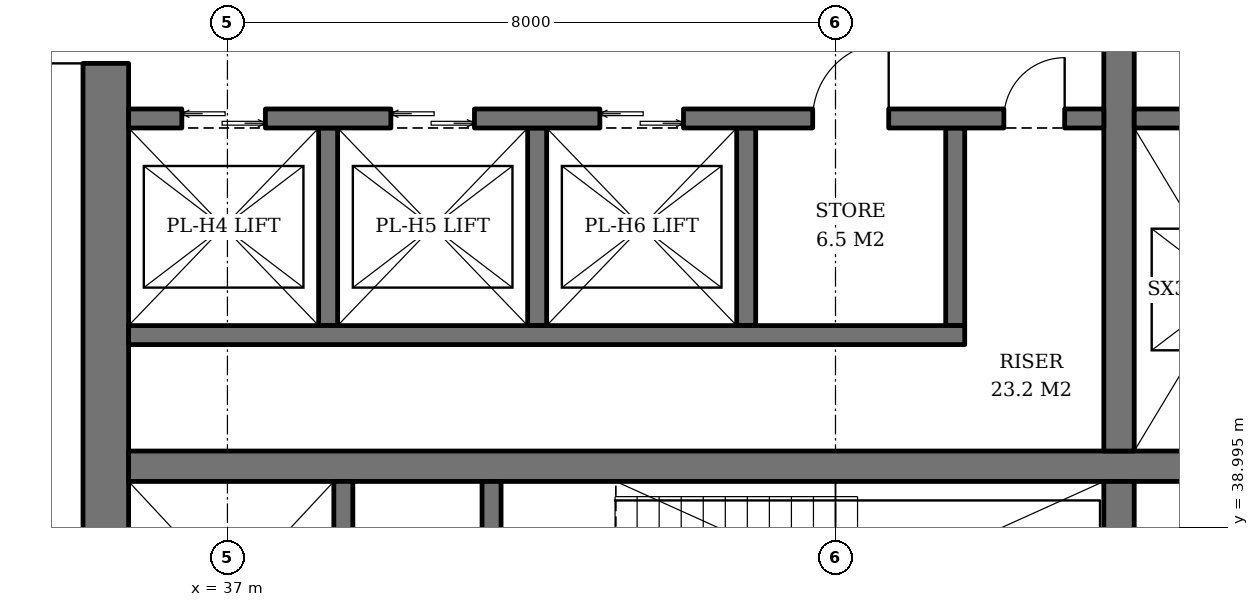
"""IFC4 building model, lengths in metres.
Left out: names, types, materials, properties, quantities, classifications, styles, units other than length and angle.
Written with IfcOpenShell. Run it as: python <this file> out.ifc"""

import sys

from ifc_helpers import new_model, si_unit, direction, frame, frame_2d, origin, place, context, subcontext, project, spatial, rectangle, extrude, element, fill, save


model = new_model("IFC4")
c1 = context("Model", 3, precision=1e-05, world=origin(), true_north=direction((0.0, 1.0)))
c2 = subcontext(c1, "Body", "Model", "MODEL_VIEW")
j1 = project(units=[si_unit("LENGTHUNIT", "METRE"), si_unit("PLANEANGLEUNIT", "RADIAN")], contexts=[c1])
p1 = place(None, origin())
s1 = spatial("IfcSite", under=j1, at=p1, CompositionType="ELEMENT")
p2 = place(p1, origin())
s2 = spatial("IfcBuilding", under=s1, at=p2, CompositionType="ELEMENT")
p3 = place(p2, frame((0.0, 0.0, 188.2)))
s3 = spatial("IfcBuildingStorey", under=s2, at=p3, CompositionType="ELEMENT", Elevation=188.2)
p4 = place(p3, frame((35.4, 36.7, 0.0), z_axis=(0.0, 0.0, 1.0), x_axis=(0.0, 1.0, 0.0)))
e1 = element("IfcWall", 1, at=p4, inside=s3, PredefinedType="SHEAR", context=c2, shape_type="SweptSolid", body=[
    extrude(rectangle(XDim=18.6, YDim=0.6, at=frame_2d((9.3, 0.0))), origin(), (0.0, 0.0, 1.0), 3.8),
])
p5 = place(p4, frame((8.4, 0.0, 0.0)))
e2 = element("IfcOpeningElement", 2, at=p5, cuts=e1, PredefinedType="OPENING", context=c2, shape_type="SweptSolid", body=[
    extrude(rectangle(XDim=1.8, YDim=2.4, at=frame_2d((0.9, 1.2))), frame((0.0, 0.31, 0.0), z_axis=(0.0, -1.0, 0.0), x_axis=(1.0, 0.0, 0.0)), (0.0, 0.0, 1.0), 0.62),
])
p6 = place(p3, frame((35.7, 39.8, 0.0), z_axis=(0.0, 0.0, 1.0), x_axis=(1.0, 0.0, 0.0)))
e3 = element("IfcWall", 3, at=p6, inside=s3, PredefinedType="SHEAR", context=c2, shape_type="SweptSolid", body=[
    extrude(rectangle(XDim=18.6, YDim=0.4, at=frame_2d((9.3, 0.0))), origin(), (0.0, 0.0, 1.0), 3.8),
])
p7 = place(p3, frame((48.73, 36.7, 0.0), z_axis=(0.0, 0.0, 1.0), x_axis=(0.0, 1.0, 0.0)))
e4 = element("IfcWall", 4, at=p7, inside=s3, PredefinedType="SHEAR", context=c2, shape_type="SweptSolid", body=[
    extrude(rectangle(XDim=2.9, YDim=0.4, at=frame_2d((1.45, 0.0))), origin(), (0.0, 0.0, 1.0), 3.8),
])
p8 = place(p3, frame((48.73, 40.0, 0.0), z_axis=(0.0, 0.0, 1.0), x_axis=(0.0, 1.0, 0.0)))
e5 = element("IfcWall", 5, at=p8, inside=s3, PredefinedType="SHEAR", context=c2, shape_type="SweptSolid", body=[
    extrude(rectangle(XDim=12.0, YDim=0.4, at=frame_2d((6.0, 0.0))), origin(), (0.0, 0.0, 1.0), 3.8),
])
p9 = place(p3, frame((38.525, 36.7, 0.0), z_axis=(0.0, 0.0, 1.0), x_axis=(0.0, 1.0, 0.0)))
e6 = element("IfcWall", 6, at=p9, inside=s3, PredefinedType="SHEAR", context=c2, shape_type="SweptSolid", body=[
    extrude(rectangle(XDim=2.9, YDim=0.25, at=frame_2d((1.45, 0.0))), origin(), (0.0, 0.0, 1.0), 3.8),
])
p10 = place(p9, frame((0.8, 0.0, 0.0)))
e7 = element("IfcOpeningElement", 7, at=p10, cuts=e6, PredefinedType="OPENING", context=c2, shape_type="SweptSolid", body=[
    extrude(rectangle(XDim=1.3, YDim=2.2, at=frame_2d((0.65, 1.1))), frame((0.0, 0.135, 0.0), z_axis=(0.0, -1.0, 0.0), x_axis=(1.0, 0.0, 0.0)), (0.0, 0.0, 1.0), 0.27),
])
p11 = place(p3, frame((40.475, 36.7, 0.0), z_axis=(0.0, 0.0, 1.0), x_axis=(0.0, 1.0, 0.0)))
e8 = element("IfcWall", 8, at=p11, inside=s3, PredefinedType="SHEAR", context=c2, shape_type="SweptSolid", body=[
    extrude(rectangle(XDim=2.9, YDim=0.25, at=frame_2d((1.45, 0.0))), origin(), (0.0, 0.0, 1.0), 3.8),
])
p12 = place(p11, frame((0.75, 0.0, 0.0)))
e9 = element("IfcOpeningElement", 9, at=p12, cuts=e8, PredefinedType="OPENING", context=c2, shape_type="SweptSolid", body=[
    extrude(rectangle(XDim=1.2, YDim=2.1, at=frame_2d((0.6, 1.05))), frame((0.0, 0.135, 0.0), z_axis=(0.0, -1.0, 0.0), x_axis=(1.0, 0.0, 0.0)), (0.0, 0.0, 1.0), 0.27),
])
for number, where, z_axis, x_axis in (
    (10, (38.325, 44.25, 0.0), (0.0, 0.0, 1.0), (0.0, -1.0, 0.0)),
    (11, (41.075, 44.25, 0.0), (0.0, 0.0, 1.0), (0.0, -1.0, 0.0)),
    (12, (43.825, 44.25, 0.0), (0.0, 0.0, 1.0), (0.0, -1.0, 0.0)),
    (13, (46.575, 44.25, 0.0), (0.0, 0.0, 1.0), (0.0, -1.0, 0.0)),
):
    element("IfcWall", number, at=place(p3, frame(where, z_axis=z_axis, x_axis=x_axis)), inside=s3, PredefinedType="SHEAR", context=c2, shape_type="SweptSolid", body=[
        extrude(rectangle(XDim=2.6, YDim=0.25, at=frame_2d((1.3, 0.0))), origin(), (0.0, 0.0, 1.0), 3.8),
    ])
p13 = place(p3, frame((35.7, 41.525, 0.0), z_axis=(0.0, 0.0, 1.0), x_axis=(1.0, 0.0, 0.0)))
e14 = element("IfcWall", 14, at=p13, inside=s3, PredefinedType="SHEAR", context=c2, shape_type="SweptSolid", body=[
    extrude(rectangle(XDim=11.0, YDim=0.25, at=frame_2d((5.5, 0.0))), origin(), (0.0, 0.0, 1.0), 3.8),
])
p14 = place(p3, frame((35.7, 44.375, 0.0), z_axis=(0.0, 0.0, 1.0), x_axis=(1.0, 0.0, 0.0)))
e15 = element("IfcWall", 15, at=p14, inside=s3, PredefinedType="SHEAR", context=c2, shape_type="SweptSolid", body=[
    extrude(rectangle(XDim=12.83, YDim=0.25, at=frame_2d((6.415, 0.0))), origin(), (0.0, 0.0, 1.0), 3.8),
])
p15 = place(p14, frame((0.7, 0.0, 0.0)))
e16 = element("IfcOpeningElement", 16, at=p15, cuts=e15, PredefinedType="OPENING", context=c2, shape_type="SweptSolid", body=[
    extrude(rectangle(XDim=1.1, YDim=2.2, at=frame_2d((0.55, 1.1))), frame((0.0, 0.135, 0.0), z_axis=(0.0, -1.0, 0.0), x_axis=(1.0, 0.0, 0.0)), (0.0, 0.0, 1.0), 0.27),
])
p16 = place(p14, frame((3.45, 0.0, 0.0)))
e17 = element("IfcOpeningElement", 17, at=p16, cuts=e15, PredefinedType="OPENING", context=c2, shape_type="SweptSolid", body=[
    extrude(rectangle(XDim=1.1, YDim=2.2, at=frame_2d((0.55, 1.1))), frame((0.0, 0.135, 0.0), z_axis=(0.0, -1.0, 0.0), x_axis=(1.0, 0.0, 0.0)), (0.0, 0.0, 1.0), 0.27),
])
p17 = place(p14, frame((6.2, 0.0, 0.0)))
e18 = element("IfcOpeningElement", 18, at=p17, cuts=e15, PredefinedType="OPENING", context=c2, shape_type="SweptSolid", body=[
    extrude(rectangle(XDim=1.1, YDim=2.2, at=frame_2d((0.55, 1.1))), frame((0.0, 0.135, 0.0), z_axis=(0.0, -1.0, 0.0), x_axis=(1.0, 0.0, 0.0)), (0.0, 0.0, 1.0), 0.27),
])
p18 = place(p14, frame((9.0, 0.0, 0.0)))
e19 = element("IfcOpeningElement", 19, at=p18, cuts=e15, PredefinedType="OPENING", context=c2, shape_type="SweptSolid", body=[
    extrude(rectangle(XDim=1.0, YDim=2.1, at=frame_2d((0.5, 1.05))), frame((0.0, 0.135, 0.0), z_axis=(0.0, -1.0, 0.0), x_axis=(1.0, 0.0, 0.0)), (0.0, 0.0, 1.0), 0.27),
])
p19 = place(p14, frame((11.515, 0.0, 0.0)))
e20 = element("IfcOpeningElement", 20, at=p19, cuts=e15, PredefinedType="OPENING", context=c2, shape_type="SweptSolid", body=[
    extrude(rectangle(XDim=0.8, YDim=2.0, at=frame_2d((0.4, 1.0))), frame((0.0, 0.135, 0.0), z_axis=(0.0, -1.0, 0.0), x_axis=(1.0, 0.0, 0.0)), (0.0, 0.0, 1.0), 0.27),
])
p20 = place(p3, frame((48.93, 44.375, 0.0), z_axis=(0.0, 0.0, 1.0), x_axis=(1.0, 0.0, 0.0)))
e21 = element("IfcWall", 21, at=p20, inside=s3, PredefinedType="SHEAR", context=c2, shape_type="SweptSolid", body=[
    extrude(rectangle(XDim=5.37, YDim=0.25, at=frame_2d((2.685, 0.0))), origin(), (0.0, 0.0, 1.0), 3.8),
])
p21 = place(p15, origin())
e22 = element("IfcDoor", 22, at=p21, inside=s3, OperationType="DOUBLE_DOOR_SLIDING", PredefinedType="DOOR", context=c2, shape_type="SweptSolid", body=[
    extrude(rectangle(XDim=1.1, YDim=2.2, at=frame_2d((0.55, 1.1))), frame((0.0, 0.025, 0.0), z_axis=(0.0, -1.0, 0.0), x_axis=(1.0, 0.0, 0.0)), (0.0, 0.0, 1.0), 0.05),
])
fill(e16, e22)
p22 = place(p16, origin())
e23 = element("IfcDoor", 23, at=p22, inside=s3, OperationType="DOUBLE_DOOR_SLIDING", PredefinedType="DOOR", context=c2, shape_type="SweptSolid", body=[
    extrude(rectangle(XDim=1.1, YDim=2.2, at=frame_2d((0.55, 1.1))), frame((0.0, 0.025, 0.0), z_axis=(0.0, -1.0, 0.0), x_axis=(1.0, 0.0, 0.0)), (0.0, 0.0, 1.0), 0.05),
])
fill(e17, e23)
p23 = place(p17, origin())
e24 = element("IfcDoor", 24, at=p23, inside=s3, OperationType="DOUBLE_DOOR_SLIDING", PredefinedType="DOOR", context=c2, shape_type="SweptSolid", body=[
    extrude(rectangle(XDim=1.1, YDim=2.2, at=frame_2d((0.55, 1.1))), frame((0.0, 0.025, 0.0), z_axis=(0.0, -1.0, 0.0), x_axis=(1.0, 0.0, 0.0)), (0.0, 0.0, 1.0), 0.05),
])
fill(e18, e24)
p24 = place(p18, origin())
e25 = element("IfcDoor", 25, at=p24, inside=s3, OperationType="SINGLE_SWING_RIGHT", PredefinedType="DOOR", context=c2, shape_type="SweptSolid", body=[
    extrude(rectangle(XDim=1.0, YDim=2.1, at=frame_2d((0.5, 1.05))), frame((0.0, 0.025, 0.0), z_axis=(0.0, -1.0, 0.0), x_axis=(1.0, 0.0, 0.0)), (0.0, 0.0, 1.0), 0.05),
])
fill(e19, e25)
p25 = place(p19, origin())
e26 = element("IfcDoor", 26, at=p25, inside=s3, OperationType="SINGLE_SWING_RIGHT", PredefinedType="DOOR", context=c2, shape_type="SweptSolid", body=[
    extrude(rectangle(XDim=0.8, YDim=2.0, at=frame_2d((0.4, 1.0))), frame((0.0, 0.025, 0.0), z_axis=(0.0, -1.0, 0.0), x_axis=(1.0, 0.0, 0.0)), (0.0, 0.0, 1.0), 0.05),
])
fill(e20, e26)
p26 = place(p5, origin())
e27 = element("IfcDoor", 27, at=p26, inside=s3, OperationType="DOUBLE_DOOR_SINGLE_SWING", PredefinedType="DOOR", context=c2, shape_type="SweptSolid", body=[
    extrude(rectangle(XDim=1.8, YDim=2.4, at=frame_2d((0.9, 1.2))), frame((0.0, 0.025, 0.0), z_axis=(0.0, -1.0, 0.0), x_axis=(1.0, 0.0, 0.0)), (0.0, 0.0, 1.0), 0.05),
])
fill(e2, e27)
save(model, sys.argv[1])
